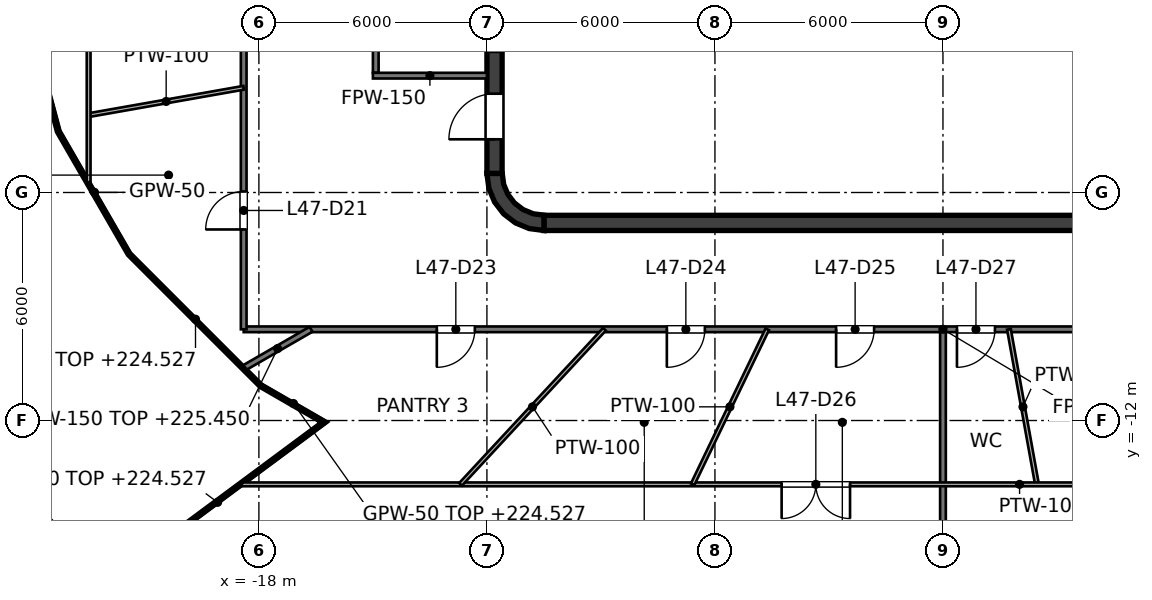
"""IFC4 building model, lengths in metres.
Left out: names, types, materials, properties, quantities, classifications, styles, units other than length and angle.
Written with IfcOpenShell. Run it as: python <this file> out.ifc"""

import sys

from ifc_helpers import new_model, si_unit, direction, frame, frame_2d, origin, place, context, subcontext, project, spatial, polyline, rectangle, outline, extrude, element, fill, save


model = new_model("IFC4")
c1 = context("Model", 3, precision=1e-05, world=origin(), true_north=direction((0.0, 1.0)))
c2 = subcontext(c1, "Body", "Model", "MODEL_VIEW")
j1 = project(units=[si_unit("LENGTHUNIT", "METRE"), si_unit("PLANEANGLEUNIT", "RADIAN")], contexts=[c1])
p1 = place(None, origin())
s1 = spatial("IfcSite", under=j1, at=p1, CompositionType="ELEMENT")
p2 = place(p1, origin())
s2 = spatial("IfcBuilding", under=s1, at=p2, CompositionType="ELEMENT")
p3 = place(p2, frame((0.0, 0.0, 221.6)))
s3 = spatial("IfcBuildingStorey", under=s2, at=p3, CompositionType="ELEMENT", Elevation=221.6)
p4 = place(p3, frame((-10.5, -6.8, 0.0), z_axis=(0.0, 0.0, 1.0), x_axis=(1.0, 0.0, 0.0)))
e1 = element("IfcWall", 1, at=p4, inside=s3, PredefinedType="SHEAR", context=c2, shape_type="SweptSolid", body=[
    extrude(rectangle(XDim=21.0, YDim=0.4, at=frame_2d((10.5, 0.0))), origin(), (0.0, 0.0, 1.0), 4.0),
])
p5 = place(p3, frame((-11.8, -5.5, 0.0), z_axis=(0.0, 0.0, 1.0), x_axis=(0.0, 1.0, 0.0)))
e2 = element("IfcWall", 2, at=p5, inside=s3, PredefinedType="SHEAR", context=c2, shape_type="SweptSolid", body=[
    extrude(rectangle(XDim=11.0, YDim=0.4, at=frame_2d((5.5, 0.0))), origin(), (0.0, 0.0, 1.0), 4.0),
])
p6 = place(p5, frame((3.2, 0.0, 0.0)))
e3 = element("IfcOpeningElement", 3, at=p6, cuts=e2, PredefinedType="OPENING", context=c2, shape_type="SweptSolid", body=[
    extrude(rectangle(XDim=1.0, YDim=2.1, at=frame_2d((0.5, 1.05))), frame((0.0, 0.2, 0.0), z_axis=(0.0, -1.0, 0.0), x_axis=(1.0, 0.0, 0.0)), (0.0, 0.0, 1.0), 0.4),
])
p7 = place(p5, frame((6.1, 0.0, 0.0)))
e4 = element("IfcOpeningElement", 4, at=p7, cuts=e2, PredefinedType="OPENING", context=c2, shape_type="SweptSolid", body=[
    extrude(rectangle(XDim=1.0, YDim=2.1, at=frame_2d((0.5, 1.05))), frame((0.0, 0.2, 0.0), z_axis=(0.0, -1.0, 0.0), x_axis=(1.0, 0.0, 0.0)), (0.0, 0.0, 1.0), 0.4),
])
p8 = place(p5, frame((0.9, 0.0, 0.0)))
e5 = element("IfcOpeningElement", 5, at=p8, cuts=e2, PredefinedType="OPENING", context=c2, shape_type="SweptSolid", body=[
    extrude(rectangle(XDim=1.2, YDim=2.1, at=frame_2d((0.6, 1.05))), frame((0.0, 0.2, 0.0), z_axis=(0.0, -1.0, 0.0), x_axis=(1.0, 0.0, 0.0)), (0.0, 0.0, 1.0), 0.4),
])
p9 = place(p5, frame((8.9, 0.0, 0.0)))
e6 = element("IfcOpeningElement", 6, at=p9, cuts=e2, PredefinedType="OPENING", context=c2, shape_type="SweptSolid", body=[
    extrude(rectangle(XDim=1.2, YDim=2.1, at=frame_2d((0.6, 1.05))), frame((0.0, 0.2, 0.0), z_axis=(0.0, -1.0, 0.0), x_axis=(1.0, 0.0, 0.0)), (0.0, 0.0, 1.0), 0.4),
])
p10 = place(p3, origin())
e7 = element("IfcWall", 7, at=p10, inside=s3, PredefinedType="SHEAR", context=c2, shape_type="SweptSolid", body=[
    extrude(outline(polyline([(-10.5, -7.0), (-10.5, -6.596), (-10.784, -6.559), (-11.048, -6.45), (-11.275, -6.275), (-11.45, -6.048), (-11.559, -5.784), (-11.596, -5.5), (-12.0, -5.5), (-11.949, -5.888), (-11.799, -6.25), (-11.561, -6.561), (-11.25, -6.799), (-10.888, -6.949), (-10.5, -7.0)])), origin(), (0.0, 0.0, 1.0), 4.0),
])
p11 = place(p3, frame((0.3, -6.6, 0.0), z_axis=(0.0, 0.0, 1.0), x_axis=(0.0, 1.0, 0.0)))
e8 = element("IfcWall", 8, at=p11, inside=s3, PredefinedType="PARTITIONING", context=c2, shape_type="SweptSolid", body=[
    extrude(rectangle(XDim=2.5, YDim=0.15, at=frame_2d((1.25, 0.0))), origin(), (0.0, 0.0, 1.0), 3.85),
])
p12 = place(p11, frame((0.8, 0.0, 0.0)))
e9 = element("IfcOpeningElement", 9, at=p12, cuts=e8, PredefinedType="OPENING", context=c2, shape_type="SweptSolid", body=[
    extrude(rectangle(XDim=0.9, YDim=2.1, at=frame_2d((0.45, 1.05))), frame((0.0, 0.075, 0.0), z_axis=(0.0, -1.0, 0.0), x_axis=(1.0, 0.0, 0.0)), (0.0, 0.0, 1.0), 0.15),
])
p13 = place(p3, frame((-9.0, -6.6, 0.0), z_axis=(0.0, 0.0, 1.0), x_axis=(0.0, 1.0, 0.0)))
e10 = element("IfcWall", 10, at=p13, inside=s3, PredefinedType="PARTITIONING", context=c2, shape_type="SweptSolid", body=[
    extrude(rectangle(XDim=2.5, YDim=0.25, at=frame_2d((1.25, 0.0))), origin(), (0.0, 0.0, 1.0), 3.85),
])
p14 = place(p13, frame((0.75, 0.0, 0.0)))
e11 = element("IfcOpeningElement", 11, at=p14, cuts=e10, PredefinedType="OPENING", context=c2, shape_type="SweptSolid", body=[
    extrude(rectangle(XDim=1.0, YDim=2.1, at=frame_2d((0.5, 1.05))), frame((0.0, 0.125, 0.0), z_axis=(0.0, -1.0, 0.0), x_axis=(1.0, 0.0, 0.0)), (0.0, 0.0, 1.0), 0.25),
])
p15 = place(p3, frame((3.15, -6.6, 0.0), z_axis=(0.0, 0.0, 1.0), x_axis=(0.0, 1.0, 0.0)))
e12 = element("IfcWall", 12, at=p15, inside=s3, PredefinedType="SOLIDWALL", context=c2, shape_type="SweptSolid", body=[
    extrude(rectangle(XDim=2.5, YDim=0.25, at=frame_2d((1.25, 0.0))), origin(), (0.0, 0.0, 1.0), 3.85),
])
p16 = place(p3, frame((-2.9, -6.6, 0.0), z_axis=(0.0, 0.0, 1.0), x_axis=(0.0, 1.0, 0.0)))
e13 = element("IfcWall", 13, at=p16, inside=s3, PredefinedType="PARTITIONING", context=c2, shape_type="SweptSolid", body=[
    extrude(rectangle(XDim=2.5, YDim=0.25, at=frame_2d((1.25, 0.0))), origin(), (0.0, 0.0, 1.0), 3.85),
])
p17 = place(p16, frame((0.8, 0.0, 0.0)))
e14 = element("IfcOpeningElement", 14, at=p17, cuts=e13, PredefinedType="OPENING", context=c2, shape_type="SweptSolid", body=[
    extrude(rectangle(XDim=0.9, YDim=2.1, at=frame_2d((0.45, 1.05))), frame((0.0, 0.125, 0.0), z_axis=(0.0, -1.0, 0.0), x_axis=(1.0, 0.0, 0.0)), (0.0, 0.0, 1.0), 0.25),
])
p18 = place(p3, frame((-9.125, -3.975, 0.0), z_axis=(0.0, 0.0, 1.0), x_axis=(1.0, 0.0, 0.0)))
e15 = element("IfcWall", 15, at=p18, inside=s3, PredefinedType="SOLIDWALL", context=c2, shape_type="SweptSolid", body=[
    extrude(rectangle(XDim=12.4, YDim=0.25, at=frame_2d((6.2, 0.0))), origin(), (0.0, 0.0, 1.0), 3.85),
])
p19 = place(p18, frame((1.05, 0.0, 0.0)))
e16 = element("IfcOpeningElement", 16, at=p19, cuts=e15, PredefinedType="OPENING", context=c2, shape_type="SweptSolid", body=[
    extrude(rectangle(XDim=1.2, YDim=2.1, at=frame_2d((0.6, 1.05))), frame((0.0, 0.125, 0.0), z_axis=(0.0, -1.0, 0.0), x_axis=(1.0, 0.0, 0.0)), (0.0, 0.0, 1.0), 0.25),
])
p20 = place(p18, frame((4.1, 0.0, 0.0)))
e17 = element("IfcOpeningElement", 17, at=p20, cuts=e15, PredefinedType="OPENING", context=c2, shape_type="SweptSolid", body=[
    extrude(rectangle(XDim=1.2, YDim=2.1, at=frame_2d((0.6, 1.05))), frame((0.0, 0.125, 0.0), z_axis=(0.0, -1.0, 0.0), x_axis=(1.0, 0.0, 0.0)), (0.0, 0.0, 1.0), 0.25),
])
p21 = place(p3, frame((3.275, -3.975, 0.0), z_axis=(0.0, 0.0, 1.0), x_axis=(1.0, 0.0, 0.0)))
e18 = element("IfcWall", 18, at=p21, inside=s3, PredefinedType="SOLIDWALL", context=c2, shape_type="SweptSolid", body=[
    extrude(rectangle(XDim=5.85, YDim=0.25, at=frame_2d((2.925, 0.0))), origin(), (0.0, 0.0, 1.0), 3.85),
])
for number, where, z_axis, x_axis in (
    (19, (-9.0, -3.85, 0.0), (0.0, 0.0, 1.0), (0.0, 1.0, 0.0)),
    (20, (-5.95, -3.85, 0.0), (0.0, 0.0, 1.0), (0.0, 1.0, 0.0)),
    (21, (-2.9, -3.85, 0.0), (0.0, 0.0, 1.0), (0.0, 1.0, 0.0)),
    (22, (0.15, -3.85, 0.0), (0.0, 0.0, 1.0), (0.0, 1.0, 0.0)),
    (23, (3.2, -3.85, 0.0), (0.0, 0.0, 1.0), (0.0, 1.0, 0.0)),
):
    element("IfcWall", number, at=place(p3, frame(where, z_axis=z_axis, x_axis=x_axis)), inside=s3, PredefinedType="SOLIDWALL", context=c2, shape_type="SweptSolid", body=[
        extrude(rectangle(XDim=2.2, YDim=0.25, at=frame_2d((1.1, 0.0))), origin(), (0.0, 0.0, 1.0), 3.85),
    ])
p22 = place(p3, frame((-14.925, -2.85, 0.0), z_axis=(0.0, 0.0, 1.0), x_axis=(0.0, 1.0, 0.0)))
e24 = element("IfcWall", 24, at=p22, inside=s3, PredefinedType="PARTITIONING", context=c2, shape_type="SweptSolid", body=[
    extrude(rectangle(XDim=5.7, YDim=0.15, at=frame_2d((2.85, 0.0))), origin(), (0.0, 0.0, 1.0), 2.918),
])
p23 = place(p3, frame((-15.0, -2.925, 0.0), z_axis=(0.0, 0.0, 1.0), x_axis=(1.0, 0.0, 0.0)))
e25 = element("IfcWall", 25, at=p23, inside=s3, PredefinedType="PARTITIONING", context=c2, shape_type="SweptSolid", body=[
    extrude(rectangle(XDim=3.0, YDim=0.15, at=frame_2d((1.5, 0.0))), origin(), (0.0, 0.0, 1.0), 2.918),
])
p24 = place(p3, frame((-18.4, -9.6, 0.0), z_axis=(0.0, 0.0, 1.0), x_axis=(1.0, 0.0, 0.0)))
e26 = element("IfcWall", 26, at=p24, inside=s3, PredefinedType="PARTITIONING", context=c2, shape_type="SweptSolid", body=[
    extrude(rectangle(XDim=36.8, YDim=0.15, at=frame_2d((18.4, 0.0))), origin(), (0.0, 0.0, 1.0), 2.927),
])
p25 = place(p24, frame((5.082, 0.0, 0.0)))
e27 = element("IfcOpeningElement", 27, at=p25, cuts=e26, PredefinedType="OPENING", context=c2, shape_type="SweptSolid", body=[
    extrude(rectangle(XDim=1.0, YDim=2.1, at=frame_2d((0.5, 1.05))), frame((0.0, 0.075, 0.0), z_axis=(0.0, -1.0, 0.0), x_axis=(1.0, 0.0, 0.0)), (0.0, 0.0, 1.0), 0.15),
])
p26 = place(p24, frame((11.135, 0.0, 0.0)))
e28 = element("IfcOpeningElement", 28, at=p26, cuts=e26, PredefinedType="OPENING", context=c2, shape_type="SweptSolid", body=[
    extrude(rectangle(XDim=1.0, YDim=2.1, at=frame_2d((0.5, 1.05))), frame((0.0, 0.075, 0.0), z_axis=(0.0, -1.0, 0.0), x_axis=(1.0, 0.0, 0.0)), (0.0, 0.0, 1.0), 0.15),
])
p27 = place(p24, frame((15.588, 0.0, 0.0)))
e29 = element("IfcOpeningElement", 29, at=p27, cuts=e26, PredefinedType="OPENING", context=c2, shape_type="SweptSolid", body=[
    extrude(rectangle(XDim=1.0, YDim=2.1, at=frame_2d((0.5, 1.05))), frame((0.0, 0.075, 0.0), z_axis=(0.0, -1.0, 0.0), x_axis=(1.0, 0.0, 0.0)), (0.0, 0.0, 1.0), 0.15),
])
p28 = place(p24, frame((18.768, 0.0, 0.0)))
e30 = element("IfcOpeningElement", 30, at=p28, cuts=e26, PredefinedType="OPENING", context=c2, shape_type="SweptSolid", body=[
    extrude(rectangle(XDim=1.0, YDim=2.1, at=frame_2d((0.5, 1.05))), frame((0.0, 0.075, 0.0), z_axis=(0.0, -1.0, 0.0), x_axis=(1.0, 0.0, 0.0)), (0.0, 0.0, 1.0), 0.15),
])
p29 = place(p24, frame((27.968, 0.0, 0.0)))
e31 = element("IfcOpeningElement", 31, at=p29, cuts=e26, PredefinedType="OPENING", context=c2, shape_type="SweptSolid", body=[
    extrude(rectangle(XDim=1.0, YDim=2.1, at=frame_2d((0.5, 1.05))), frame((0.0, 0.075, 0.0), z_axis=(0.0, -1.0, 0.0), x_axis=(1.0, 0.0, 0.0)), (0.0, 0.0, 1.0), 0.15),
])
p30 = place(p3, frame((-18.387, -10.615, 0.0), z_axis=(0.0, 0.0, 1.0), x_axis=(0.866037445929, 0.499979141813, 0.0)))
e32 = element("IfcWall", 32, at=p30, inside=s3, PredefinedType="PARTITIONING", context=c2, shape_type="SweptSolid", body=[
    extrude(rectangle(XDim=2.031, YDim=0.15, at=frame_2d((1.015, 0.0))), origin(), (0.0, 0.0, 1.0), 3.85),
])
p31 = place(p3, frame((0.0, -22.926, 0.0), z_axis=(0.0, 0.0, 1.0), x_axis=(0.0, 1.0, 0.0)))
e33 = element("IfcWall", 33, at=p31, inside=s3, PredefinedType="PARTITIONING", context=c2, shape_type="SweptSolid", body=[
    extrude(rectangle(XDim=13.326, YDim=0.15, at=frame_2d((6.663, 0.0))), origin(), (0.0, 0.0, 1.0), 2.995),
])
p32 = place(p3, frame((-18.4, -9.6, 0.0), z_axis=(0.0, 0.0, 1.0), x_axis=(0.0, 1.0, 0.0)))
e34 = element("IfcWall", 34, at=p32, inside=s3, PredefinedType="PARTITIONING", context=c2, shape_type="SweptSolid", body=[
    extrude(rectangle(XDim=19.2, YDim=0.15, at=frame_2d((9.6, 0.0))), origin(), (0.0, 0.0, 1.0), 2.918),
])
p33 = place(p32, frame((16.655, 0.0, 0.0)))
e35 = element("IfcOpeningElement", 35, at=p33, cuts=e34, PredefinedType="OPENING", context=c2, shape_type="SweptSolid", body=[
    extrude(rectangle(XDim=1.0, YDim=2.1, at=frame_2d((0.5, 1.05))), frame((0.0, 0.075, 0.0), z_axis=(0.0, -1.0, 0.0), x_axis=(1.0, 0.0, 0.0)), (0.0, 0.0, 1.0), 0.15),
])
p34 = place(p32, frame((12.39, 0.0, 0.0)))
e36 = element("IfcOpeningElement", 36, at=p34, cuts=e34, PredefinedType="OPENING", context=c2, shape_type="SweptSolid", body=[
    extrude(rectangle(XDim=1.0, YDim=2.1, at=frame_2d((0.5, 1.05))), frame((0.0, 0.075, 0.0), z_axis=(0.0, -1.0, 0.0), x_axis=(1.0, 0.0, 0.0)), (0.0, 0.0, 1.0), 0.15),
])
p35 = place(p32, frame((7.964, 0.0, 0.0)))
e37 = element("IfcOpeningElement", 37, at=p35, cuts=e34, PredefinedType="OPENING", context=c2, shape_type="SweptSolid", body=[
    extrude(rectangle(XDim=1.0, YDim=2.1, at=frame_2d((0.5, 1.05))), frame((0.0, 0.075, 0.0), z_axis=(0.0, -1.0, 0.0), x_axis=(1.0, 0.0, 0.0)), (0.0, 0.0, 1.0), 0.15),
])
p36 = place(p32, frame((2.627, 0.0, 0.0)))
e38 = element("IfcOpeningElement", 38, at=p36, cuts=e34, PredefinedType="OPENING", context=c2, shape_type="SweptSolid", body=[
    extrude(rectangle(XDim=1.0, YDim=2.1, at=frame_2d((0.5, 1.05))), frame((0.0, 0.075, 0.0), z_axis=(0.0, -1.0, 0.0), x_axis=(1.0, 0.0, 0.0)), (0.0, 0.0, 1.0), 0.15),
])
p37 = place(p3, frame((-24.048, -1.426, 0.0), z_axis=(0.0, 0.0, 1.0), x_axis=(0.258635126036, -0.965975088488, 0.0)))
e39 = element("IfcWall", 39, at=p37, inside=s3, PredefinedType="PARTITIONING", context=c2, shape_type="SweptSolid", body=[
    extrude(rectangle(XDim=3.062, YDim=0.05, at=frame_2d((1.531, 0.0))), origin(), (0.0, 0.0, 1.0), 2.918),
])
p38 = place(p3, frame((-23.256, -4.384, 0.0), z_axis=(0.0, 0.0, 1.0), x_axis=(0.499985652865, -0.866033686948, 0.0)))
e40 = element("IfcWall", 40, at=p38, inside=s3, PredefinedType="PARTITIONING", context=c2, shape_type="SweptSolid", body=[
    extrude(rectangle(XDim=3.72, YDim=0.05, at=frame_2d((1.86, 0.0))), origin(), (0.0, 0.0, 1.0), 2.918),
])
p39 = place(p3, frame((-21.396, -7.606, 0.0), z_axis=(0.0, 0.0, 1.0), x_axis=(0.707106781187, -0.707106781187, 0.0)))
e41 = element("IfcWall", 41, at=p39, inside=s3, PredefinedType="PARTITIONING", context=c2, shape_type="SweptSolid", body=[
    extrude(rectangle(XDim=4.888, YDim=0.05, at=frame_2d((2.444, 0.0))), origin(), (0.0, 0.0, 1.0), 2.927),
])
p40 = place(p3, frame((-17.94, -11.062, 0.0), z_axis=(0.0, 0.0, 1.0), x_axis=(0.866137951632, -0.499805010722, 0.0)))
e42 = element("IfcWall", 42, at=p40, inside=s3, PredefinedType="PARTITIONING", context=c2, shape_type="SweptSolid", body=[
    extrude(rectangle(XDim=1.963, YDim=0.05, at=frame_2d((0.981, 0.0))), origin(), (0.0, 0.0, 1.0), 2.927),
])
p41 = place(p3, frame((-21.931, -16.263, 0.0), z_axis=(0.0, 0.0, 1.0), x_axis=(0.803271406244, 0.595613169692, 0.0)))
e43 = element("IfcWall", 43, at=p41, inside=s3, PredefinedType="PARTITIONING", context=c2, shape_type="SweptSolid", body=[
    extrude(rectangle(XDim=7.085, YDim=0.05, at=frame_2d((3.542, 0.0))), origin(), (0.0, 0.0, 1.0), 2.927),
])
p42 = place(p3, frame((1.736, -9.6, 0.0), z_axis=(0.0, 0.0, 1.0), x_axis=(0.178009628273, -0.984028745638, 0.0)))
e44 = element("IfcWall", 44, at=p42, inside=s3, PredefinedType="PARTITIONING", context=c2, shape_type="SweptSolid", body=[
    extrude(rectangle(XDim=4.146, YDim=0.1, at=frame_2d((2.073, 0.0))), origin(), (0.0, 0.0, 1.0), 3.85),
])
p43 = place(p3, frame((-18.448, -13.68, 0.0), z_axis=(0.0, 0.0, 1.0), x_axis=(1.0, 0.0, 0.0)))
e45 = element("IfcWall", 45, at=p43, inside=s3, PredefinedType="PARTITIONING", context=c2, shape_type="SweptSolid", body=[
    extrude(rectangle(XDim=40.928, YDim=0.1, at=frame_2d((20.464, 0.0))), origin(), (0.0, 0.0, 1.0), 2.927),
])
p44 = place(p43, frame((14.203, 0.0, 0.0)))
e46 = element("IfcOpeningElement", 46, at=p44, cuts=e45, PredefinedType="OPENING", context=c2, shape_type="SweptSolid", body=[
    extrude(rectangle(XDim=1.8, YDim=2.1, at=frame_2d((0.9, 1.05))), frame((0.0, 0.05, 0.0), z_axis=(0.0, -1.0, 0.0), x_axis=(1.0, 0.0, 0.0)), (0.0, 0.0, 1.0), 0.1),
])
p45 = place(p43, frame((30.025, 0.0, 0.0)))
e47 = element("IfcOpeningElement", 47, at=p45, cuts=e45, PredefinedType="OPENING", context=c2, shape_type="SweptSolid", body=[
    extrude(rectangle(XDim=1.8, YDim=2.1, at=frame_2d((0.9, 1.05))), frame((0.0, 0.05, 0.0), z_axis=(0.0, -1.0, 0.0), x_axis=(1.0, 0.0, 0.0)), (0.0, 0.0, 1.0), 0.1),
])
p46 = place(p3, frame((-22.48, -3.964, 0.0), z_axis=(0.0, 0.0, 1.0), x_axis=(0.984775252653, 0.173832395604, 0.0)))
e48 = element("IfcWall", 48, at=p46, inside=s3, PredefinedType="PARTITIONING", context=c2, shape_type="SweptSolid", body=[
    extrude(rectangle(XDim=4.143, YDim=0.1, at=frame_2d((2.072, 0.0))), origin(), (0.0, 0.0, 1.0), 3.85),
])
p47 = place(p3, frame((-12.694, -13.68, 0.0), z_axis=(0.0, 0.0, 1.0), x_axis=(0.680230670979, 0.732998113408, 0.0)))
e49 = element("IfcWall", 49, at=p47, inside=s3, PredefinedType="PARTITIONING", context=c2, shape_type="SweptSolid", body=[
    extrude(rectangle(XDim=5.566, YDim=0.1, at=frame_2d((2.783, 0.0))), origin(), (0.0, 0.0, 1.0), 3.85),
])
p48 = place(p3, frame((-6.588, -13.68, 0.0), z_axis=(0.0, 0.0, 1.0), x_axis=(0.43390153131, 0.900960299418, 0.0)))
e50 = element("IfcWall", 50, at=p48, inside=s3, PredefinedType="PARTITIONING", context=c2, shape_type="SweptSolid", body=[
    extrude(rectangle(XDim=4.528, YDim=0.1, at=frame_2d((2.264, 0.0))), origin(), (0.0, 0.0, 1.0), 3.85),
])
p49 = place(p3, frame((-22.48, -5.728, 0.0), z_axis=(0.0, 0.0, 1.0), x_axis=(0.0, 1.0, 0.0)))
e51 = element("IfcWall", 51, at=p49, inside=s3, PredefinedType="PARTITIONING", context=c2, shape_type="SweptSolid", body=[
    extrude(rectangle(XDim=19.408, YDim=0.1, at=frame_2d((9.704, 0.0))), origin(), (0.0, 0.0, 1.0), 2.918),
])
p50 = place(p49, frame((15.082, 0.0, 0.0)))
e52 = element("IfcOpeningElement", 52, at=p50, cuts=e51, PredefinedType="OPENING", context=c2, shape_type="SweptSolid", body=[
    extrude(rectangle(XDim=0.9, YDim=2.1, at=frame_2d((0.45, 1.05))), frame((0.0, 0.05, 0.0), z_axis=(0.0, -1.0, 0.0), x_axis=(1.0, 0.0, 0.0)), (0.0, 0.0, 1.0), 0.1),
])
p51 = place(p19, origin())
e53 = element("IfcDoor", 53, at=p51, inside=s3, OperationType="DOUBLE_DOOR_SLIDING", PredefinedType="DOOR", context=c2, shape_type="SweptSolid", body=[
    extrude(rectangle(XDim=1.2, YDim=2.1, at=frame_2d((0.6, 1.05))), frame((0.0, 0.025, 0.0), z_axis=(0.0, -1.0, 0.0), x_axis=(1.0, 0.0, 0.0)), (0.0, 0.0, 1.0), 0.05),
])
fill(e16, e53)
p52 = place(p20, origin())
e54 = element("IfcDoor", 54, at=p52, inside=s3, OperationType="DOUBLE_DOOR_SLIDING", PredefinedType="DOOR", context=c2, shape_type="SweptSolid", body=[
    extrude(rectangle(XDim=1.2, YDim=2.1, at=frame_2d((0.6, 1.05))), frame((0.0, 0.025, 0.0), z_axis=(0.0, -1.0, 0.0), x_axis=(1.0, 0.0, 0.0)), (0.0, 0.0, 1.0), 0.05),
])
fill(e17, e54)
p53 = place(p14, origin())
e55 = element("IfcDoor", 55, at=p53, inside=s3, OperationType="SINGLE_SWING_LEFT", PredefinedType="DOOR", context=c2, shape_type="SweptSolid", body=[
    extrude(rectangle(XDim=1.0, YDim=2.1, at=frame_2d((0.5, 1.05))), frame((0.0, 0.025, 0.0), z_axis=(0.0, -1.0, 0.0), x_axis=(1.0, 0.0, 0.0)), (0.0, 0.0, 1.0), 0.05),
])
fill(e11, e55)
p54 = place(p17, origin())
e56 = element("IfcDoor", 56, at=p54, inside=s3, OperationType="SINGLE_SWING_RIGHT", PredefinedType="DOOR", context=c2, shape_type="SweptSolid", body=[
    extrude(rectangle(XDim=0.9, YDim=2.1, at=frame_2d((0.45, 1.05))), frame((0.0, 0.025, 0.0), z_axis=(0.0, -1.0, 0.0), x_axis=(1.0, 0.0, 0.0)), (0.0, 0.0, 1.0), 0.05),
])
fill(e14, e56)
p55 = place(p12, origin())
e57 = element("IfcDoor", 57, at=p55, inside=s3, OperationType="SINGLE_SWING_RIGHT", PredefinedType="DOOR", context=c2, shape_type="SweptSolid", body=[
    extrude(rectangle(XDim=0.9, YDim=2.1, at=frame_2d((0.45, 1.05))), frame((0.0, 0.025, 0.0), z_axis=(0.0, -1.0, 0.0), x_axis=(1.0, 0.0, 0.0)), (0.0, 0.0, 1.0), 0.05),
])
fill(e9, e57)
p56 = place(p8, origin())
e58 = element("IfcDoor", 58, at=p56, inside=s3, OperationType="SINGLE_SWING_LEFT", PredefinedType="DOOR", context=c2, shape_type="SweptSolid", body=[
    extrude(rectangle(XDim=1.2, YDim=2.1, at=frame_2d((0.6, 1.05))), frame((0.0, 0.025, 0.0), z_axis=(0.0, -1.0, 0.0), x_axis=(1.0, 0.0, 0.0)), (0.0, 0.0, 1.0), 0.05),
])
fill(e5, e58)
p57 = place(p36, origin())
e59 = element("IfcDoor", 59, at=p57, inside=s3, OperationType="SINGLE_SWING_LEFT", PredefinedType="DOOR", context=c2, shape_type="SweptSolid", body=[
    extrude(rectangle(XDim=1.0, YDim=2.1, at=frame_2d((0.5, 1.05))), frame((0.0, 0.025, 0.0), z_axis=(0.0, -1.0, 0.0), x_axis=(1.0, 0.0, 0.0)), (0.0, 0.0, 1.0), 0.05),
])
fill(e38, e59)
p58 = place(p25, origin())
e60 = element("IfcDoor", 60, at=p58, inside=s3, OperationType="SINGLE_SWING_LEFT", PredefinedType="DOOR", context=c2, shape_type="SweptSolid", body=[
    extrude(rectangle(XDim=1.0, YDim=2.1, at=frame_2d((0.5, 1.05))), frame((0.0, 0.025, 0.0), z_axis=(0.0, -1.0, 0.0), x_axis=(1.0, 0.0, 0.0)), (0.0, 0.0, 1.0), 0.05),
])
fill(e27, e60)
p59 = place(p26, origin())
e61 = element("IfcDoor", 61, at=p59, inside=s3, OperationType="SINGLE_SWING_LEFT", PredefinedType="DOOR", context=c2, shape_type="SweptSolid", body=[
    extrude(rectangle(XDim=1.0, YDim=2.1, at=frame_2d((0.5, 1.05))), frame((0.0, 0.025, 0.0), z_axis=(0.0, -1.0, 0.0), x_axis=(1.0, 0.0, 0.0)), (0.0, 0.0, 1.0), 0.05),
])
fill(e28, e61)
p60 = place(p27, origin())
e62 = element("IfcDoor", 62, at=p60, inside=s3, OperationType="SINGLE_SWING_LEFT", PredefinedType="DOOR", context=c2, shape_type="SweptSolid", body=[
    extrude(rectangle(XDim=1.0, YDim=2.1, at=frame_2d((0.5, 1.05))), frame((0.0, 0.025, 0.0), z_axis=(0.0, -1.0, 0.0), x_axis=(1.0, 0.0, 0.0)), (0.0, 0.0, 1.0), 0.05),
])
fill(e29, e62)
p61 = place(p44, origin())
e63 = element("IfcDoor", 63, at=p61, inside=s3, OperationType="DOUBLE_DOOR_SINGLE_SWING", PredefinedType="DOOR", context=c2, shape_type="SweptSolid", body=[
    extrude(rectangle(XDim=1.8, YDim=2.1, at=frame_2d((0.9, 1.05))), frame((0.0, 0.025, 0.0), z_axis=(0.0, -1.0, 0.0), x_axis=(1.0, 0.0, 0.0)), (0.0, 0.0, 1.0), 0.05),
])
fill(e46, e63)
p62 = place(p28, origin())
e64 = element("IfcDoor", 64, at=p62, inside=s3, OperationType="SINGLE_SWING_LEFT", PredefinedType="DOOR", context=c2, shape_type="SweptSolid", body=[
    extrude(rectangle(XDim=1.0, YDim=2.1, at=frame_2d((0.5, 1.05))), frame((0.0, 0.025, 0.0), z_axis=(0.0, -1.0, 0.0), x_axis=(1.0, 0.0, 0.0)), (0.0, 0.0, 1.0), 0.05),
])
fill(e30, e64)
save(model, sys.argv[1])
